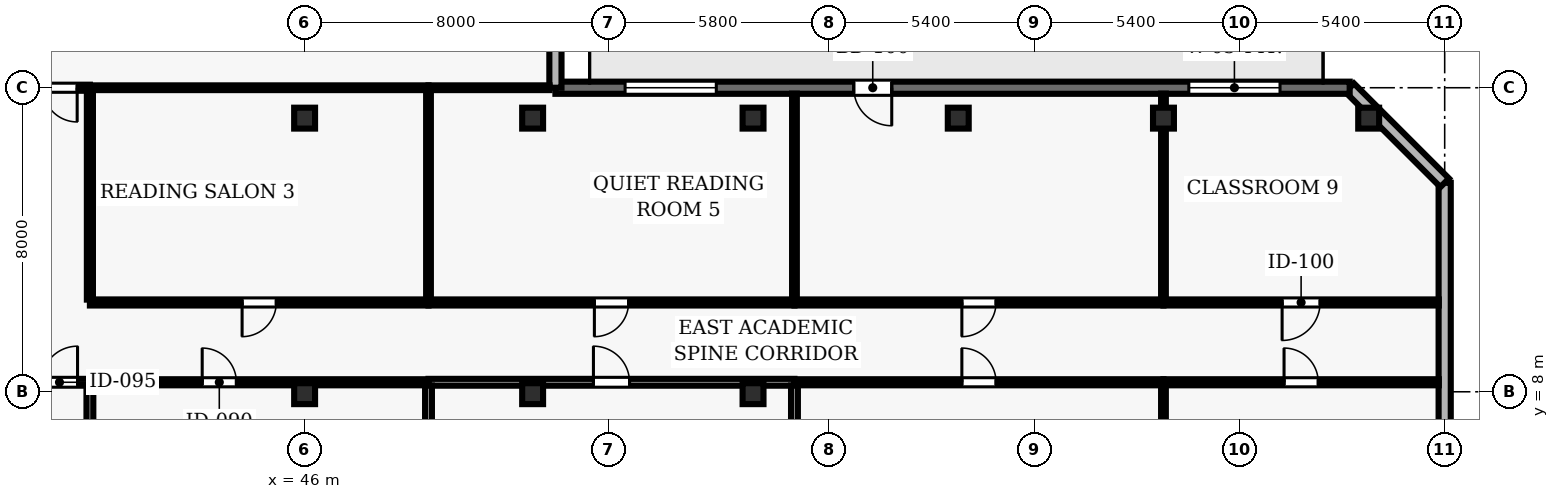
"""IFC4 building model, lengths in metres.
Left out: names, types, materials, properties, quantities, classifications, styles, units other than length and angle.
Written with IfcOpenShell. Run it as: python <this file> out.ifc"""

import sys

from ifc_helpers import new_model, si_unit, direction, frame, frame_2d, origin, origin_2d, place, context, subcontext, project, spatial, rectangle, hollow_rectangle, extrude, element, fill, save


model = new_model("IFC4")
c1 = context("Model", 3, precision=1e-05, world=origin(), true_north=direction((0.0, 1.0)))
c2 = subcontext(c1, "Body", "Model", "MODEL_VIEW")
j1 = project(units=[si_unit("LENGTHUNIT", "METRE"), si_unit("PLANEANGLEUNIT", "RADIAN")], contexts=[c1])
p1 = place(None, origin())
s1 = spatial("IfcSite", under=j1, at=p1, CompositionType="ELEMENT")
p2 = place(p1, origin())
s2 = spatial("IfcBuilding", under=s1, at=p2, CompositionType="ELEMENT")
p3 = place(p2, frame((0.0, 0.0, 54.4)))
s3 = spatial("IfcBuildingStorey", under=s2, at=p3, CompositionType="ELEMENT", Elevation=54.4)
for number, where, z_axis, x_axis in (
    (1, (46.0, 7.95, 0.0), (0.0, 0.0, 1.0), (1.0, 0.0, 0.0)),
    (2, (46.0, 15.2, 0.0), (0.0, 0.0, 1.0), (1.0, 0.0, 0.0)),
    (3, (52.0, 7.95, 0.0), (0.0, 0.0, 1.0), (1.0, 0.0, 0.0)),
    (4, (52.0, 15.2, 0.0), (0.0, 0.0, 1.0), (1.0, 0.0, 0.0)),
    (5, (57.8, 7.95, 0.0), (0.0, 0.0, 1.0), (1.0, 0.0, 0.0)),
    (6, (57.8, 15.2, 0.0), (0.0, 0.0, 1.0), (1.0, 0.0, 0.0)),
    (7, (63.2, 15.2, 0.0), (0.0, 0.0, 1.0), (1.0, 0.0, 0.0)),
    (8, (68.6, 15.2, 0.0), (0.0, 0.0, 1.0), (1.0, 0.0, 0.0)),
    (9, (74.0, 15.2, 0.0), (0.0, 0.0, 1.0), (1.0, 0.0, 0.0)),
):
    element("IfcColumn", number, at=place(p3, frame(where, z_axis=z_axis, x_axis=x_axis)), inside=s3, PredefinedType="COLUMN", context=c2, shape_type="SweptSolid", body=[
        extrude(hollow_rectangle(XDim=0.55, YDim=0.55, WallThickness=0.025, at=origin_2d()), origin(), (0.0, 0.0, 1.0), 3.9),
    ])
p4 = place(p3, frame((76.0, 2.5, 0.0), z_axis=(0.0, 0.0, 1.0), x_axis=(0.0, 1.0, 0.0)))
e10 = element("IfcWall", 10, at=p4, inside=s3, PredefinedType="SOLIDWALL", context=c2, shape_type="SweptSolid", body=[
    extrude(rectangle(XDim=11.0, YDim=0.32, at=frame_2d((5.5, 0.0))), origin(), (0.0, 0.0, 1.0), 3.69),
])
p5 = place(p4, frame((1.85, 0.0, 0.9)))
e11 = element("IfcOpeningElement", 11, at=p5, cuts=e10, PredefinedType="OPENING", context=c2, shape_type="SweptSolid", body=[
    extrude(rectangle(XDim=1.8, YDim=1.6, at=frame_2d((0.9, 0.8))), frame((0.0, 0.17, 0.0), z_axis=(0.0, -1.0, 0.0), x_axis=(1.0, 0.0, 0.0)), (0.0, 0.0, 1.0), 0.34),
])
p6 = place(p3, frame((76.0, 13.5, 0.0), z_axis=(0.0, 0.0, 1.0), x_axis=(-0.707106781187, 0.707106781187, 0.0)))
e12 = element("IfcWall", 12, at=p6, inside=s3, PredefinedType="SOLIDWALL", context=c2, shape_type="SweptSolid", body=[
    extrude(rectangle(XDim=3.536, YDim=0.32, at=frame_2d((1.768, 0.0))), origin(), (0.0, 0.0, 1.0), 3.69),
])
p7 = place(p3, frame((73.5, 16.0, 0.0), z_axis=(0.0, 0.0, 1.0), x_axis=(-1.0, 0.0, 0.0)))
e13 = element("IfcWall", 13, at=p7, inside=s3, PredefinedType="SOLIDWALL", context=c2, shape_type="SweptSolid", body=[
    extrude(rectangle(XDim=20.9, YDim=0.32, at=frame_2d((10.45, 0.0))), origin(), (0.0, 0.0, 1.0), 3.69),
])
p8 = place(p7, frame((12.05, 0.0, 0.0)))
e14 = element("IfcOpeningElement", 14, at=p8, cuts=e13, PredefinedType="OPENING", context=c2, shape_type="SweptSolid", body=[
    extrude(rectangle(XDim=1.0, YDim=2.2, at=frame_2d((0.5, 1.1))), frame((0.0, 0.17, 0.0), z_axis=(0.0, -1.0, 0.0), x_axis=(1.0, 0.0, 0.0)), (0.0, 0.0, 1.0), 0.34),
])
p9 = place(p7, frame((1.833, 0.0, 0.9)))
e15 = element("IfcOpeningElement", 15, at=p9, cuts=e13, PredefinedType="OPENING", context=c2, shape_type="SweptSolid", body=[
    extrude(rectangle(XDim=2.4, YDim=1.6, at=frame_2d((1.2, 0.8))), frame((0.0, 0.17, 0.0), z_axis=(0.0, -1.0, 0.0), x_axis=(1.0, 0.0, 0.0)), (0.0, 0.0, 1.0), 0.34),
])
p10 = place(p7, frame((16.667, 0.0, 0.9)))
e16 = element("IfcOpeningElement", 16, at=p10, cuts=e13, PredefinedType="OPENING", context=c2, shape_type="SweptSolid", body=[
    extrude(rectangle(XDim=2.4, YDim=1.6, at=frame_2d((1.2, 0.8))), frame((0.0, 0.17, 0.0), z_axis=(0.0, -1.0, 0.0), x_axis=(1.0, 0.0, 0.0)), (0.0, 0.0, 1.0), 0.34),
])
p11 = place(p3, frame((52.6, 16.0, 0.0), z_axis=(0.0, 0.0, 1.0), x_axis=(0.0, 1.0, 0.0)))
e17 = element("IfcWall", 17, at=p11, inside=s3, PredefinedType="SOLIDWALL", context=c2, shape_type="SweptSolid", body=[
    extrude(rectangle(XDim=10.095, YDim=0.32, at=frame_2d((5.047, 0.0))), origin(), (0.0, 0.0, 1.0), 3.69),
])
p12 = place(p11, frame((4.297, 0.0, 0.9)))
e18 = element("IfcOpeningElement", 18, at=p12, cuts=e17, PredefinedType="OPENING", context=c2, shape_type="SweptSolid", body=[
    extrude(rectangle(XDim=1.5, YDim=1.8, at=frame_2d((0.75, 0.9))), frame((0.0, 0.17, 0.0), z_axis=(0.0, -1.0, 0.0), x_axis=(1.0, 0.0, 0.0)), (0.0, 0.0, 1.0), 0.34),
])
p13 = place(p3, frame((38.05, 8.25, 0.0), z_axis=(0.0, 0.0, 1.0), x_axis=(1.0, 0.0, 0.0)))
e19 = element("IfcWall", 19, at=p13, inside=s3, PredefinedType="PARTITIONING", context=c2, shape_type="SweptSolid", body=[
    extrude(rectangle(XDim=2.3, YDim=0.18, at=frame_2d((1.15, 0.0))), origin(), (0.0, 0.0, 1.0), 2.995),
])
p14 = place(p13, frame((1.025, 0.0, 0.0)))
e20 = element("IfcOpeningElement", 20, at=p14, cuts=e19, PredefinedType="OPENING", context=c2, shape_type="SweptSolid", body=[
    extrude(rectangle(XDim=0.95, YDim=2.1, at=frame_2d((0.475, 1.05))), frame((0.0, 0.1, 0.0), z_axis=(0.0, -1.0, 0.0), x_axis=(1.0, 0.0, 0.0)), (0.0, 0.0, 1.0), 0.2),
])
p15 = place(p3, frame((40.35, 8.25, 0.0), z_axis=(0.0, 0.0, 1.0), x_axis=(1.0, 0.0, 0.0)))
e21 = element("IfcWall", 21, at=p15, inside=s3, PredefinedType="PARTITIONING", context=c2, shape_type="SweptSolid", body=[
    extrude(rectangle(XDim=8.91, YDim=0.16, at=frame_2d((4.455, 0.0))), origin(), (0.0, 0.0, 1.0), 2.995),
])
p16 = place(p15, frame((2.955, 0.0, 0.0)))
e22 = element("IfcOpeningElement", 22, at=p16, cuts=e21, PredefinedType="OPENING", context=c2, shape_type="SweptSolid", body=[
    extrude(rectangle(XDim=0.9, YDim=2.1, at=frame_2d((0.45, 1.05))), frame((0.0, 0.09, 0.0), z_axis=(0.0, -1.0, 0.0), x_axis=(1.0, 0.0, 0.0)), (0.0, 0.0, 1.0), 0.18),
])
p17 = place(p3, frame((40.35, 16.0, 0.0), z_axis=(0.0, 0.0, 1.0), x_axis=(-1.0, 0.0, 0.0)))
e23 = element("IfcWall", 23, at=p17, inside=s3, PredefinedType="PARTITIONING", context=c2, shape_type="SweptSolid", body=[
    extrude(rectangle(XDim=2.27, YDim=0.16, at=frame_2d((1.135, 0.0))), origin(), (0.0, 0.0, 1.0), 3.69),
])
p18 = place(p17, frame((0.335, 0.0, 0.0)))
e24 = element("IfcOpeningElement", 24, at=p18, cuts=e23, PredefinedType="OPENING", context=c2, shape_type="SweptSolid", body=[
    extrude(rectangle(XDim=0.9, YDim=2.1, at=frame_2d((0.45, 1.05))), frame((0.0, 0.09, 0.0), z_axis=(0.0, -1.0, 0.0), x_axis=(1.0, 0.0, 0.0)), (0.0, 0.0, 1.0), 0.18),
])
p19 = place(p3, frame((49.26, 8.25, 0.0), z_axis=(0.0, 0.0, 1.0), x_axis=(1.0, 0.0, 0.0)))
e25 = element("IfcWall", 25, at=p19, inside=s3, PredefinedType="PARTITIONING", context=c2, shape_type="SweptSolid", body=[
    extrude(rectangle(XDim=9.63, YDim=0.18, at=frame_2d((4.815, 0.0))), origin(), (0.0, 0.0, 1.0), 2.995),
])
p20 = place(p19, frame((4.34, 0.0, 0.0)))
e26 = element("IfcOpeningElement", 26, at=p20, cuts=e25, PredefinedType="OPENING", context=c2, shape_type="SweptSolid", body=[
    extrude(rectangle(XDim=0.95, YDim=2.1, at=frame_2d((0.475, 1.05))), frame((0.0, 0.1, 0.0), z_axis=(0.0, -1.0, 0.0), x_axis=(1.0, 0.0, 0.0)), (0.0, 0.0, 1.0), 0.2),
])
p21 = place(p3, frame((49.26, 10.35, 0.0), z_axis=(0.0, 0.0, 1.0), x_axis=(-1.0, 0.0, 0.0)))
e27 = element("IfcWall", 27, at=p21, inside=s3, PredefinedType="PARTITIONING", context=c2, shape_type="SweptSolid", body=[
    extrude(rectangle(XDim=8.91, YDim=0.16, at=frame_2d((4.455, 0.0))), origin(), (0.0, 0.0, 1.0), 3.227),
])
p22 = place(p21, frame((4.005, 0.0, 0.0)))
e28 = element("IfcOpeningElement", 28, at=p22, cuts=e27, PredefinedType="OPENING", context=c2, shape_type="SweptSolid", body=[
    extrude(rectangle(XDim=0.9, YDim=2.1, at=frame_2d((0.45, 1.05))), frame((0.0, 0.09, 0.0), z_axis=(0.0, -1.0, 0.0), x_axis=(1.0, 0.0, 0.0)), (0.0, 0.0, 1.0), 0.18),
])
p23 = place(p3, frame((49.26, 16.0, 0.0), z_axis=(0.0, 0.0, 1.0), x_axis=(1.0, 0.0, 0.0)))
e29 = element("IfcWall", 29, at=p23, inside=s3, PredefinedType="PARTITIONING", context=c2, shape_type="SweptSolid", body=[
    extrude(rectangle(XDim=3.185, YDim=0.125, at=frame_2d((1.593, 0.0))), origin(), (0.0, 0.0, 1.0), 3.39),
])
p24 = place(p3, frame((49.26, 16.0, 0.0), z_axis=(0.0, 0.0, 1.0), x_axis=(-1.0, 0.0, 0.0)))
e30 = element("IfcWall", 30, at=p24, inside=s3, PredefinedType="PARTITIONING", context=c2, shape_type="SweptSolid", body=[
    extrude(rectangle(XDim=8.91, YDim=0.125, at=frame_2d((4.455, 0.0))), origin(), (0.0, 0.0, 1.0), 3.69),
])
p25 = place(p3, frame((58.89, 8.25, 0.0), z_axis=(0.0, 0.0, 1.0), x_axis=(1.0, 0.0, 0.0)))
e31 = element("IfcWall", 31, at=p25, inside=s3, PredefinedType="PARTITIONING", context=c2, shape_type="SweptSolid", body=[
    extrude(rectangle(XDim=9.71, YDim=0.16, at=frame_2d((4.855, 0.0))), origin(), (0.0, 0.0, 1.0), 3.69),
])
p26 = place(p25, frame((4.405, 0.0, 0.0)))
e32 = element("IfcOpeningElement", 32, at=p26, cuts=e31, PredefinedType="OPENING", context=c2, shape_type="SweptSolid", body=[
    extrude(rectangle(XDim=0.9, YDim=2.1, at=frame_2d((0.45, 1.05))), frame((0.0, 0.09, 0.0), z_axis=(0.0, -1.0, 0.0), x_axis=(1.0, 0.0, 0.0)), (0.0, 0.0, 1.0), 0.18),
])
p27 = place(p3, frame((58.89, 10.35, 0.0), z_axis=(0.0, 0.0, 1.0), x_axis=(-1.0, 0.0, 0.0)))
e33 = element("IfcWall", 33, at=p27, inside=s3, PredefinedType="PARTITIONING", context=c2, shape_type="SweptSolid", body=[
    extrude(rectangle(XDim=9.63, YDim=0.16, at=frame_2d((4.815, 0.0))), origin(), (0.0, 0.0, 1.0), 3.227),
])
p28 = place(p27, frame((4.365, 0.0, 0.0)))
e34 = element("IfcOpeningElement", 34, at=p28, cuts=e33, PredefinedType="OPENING", context=c2, shape_type="SweptSolid", body=[
    extrude(rectangle(XDim=0.9, YDim=2.1, at=frame_2d((0.45, 1.05))), frame((0.0, 0.09, 0.0), z_axis=(0.0, -1.0, 0.0), x_axis=(1.0, 0.0, 0.0)), (0.0, 0.0, 1.0), 0.18),
])
p29 = place(p3, frame((68.6, 8.25, 0.0), z_axis=(0.0, 0.0, 1.0), x_axis=(1.0, 0.0, 0.0)))
e35 = element("IfcWall", 35, at=p29, inside=s3, PredefinedType="PARTITIONING", context=c2, shape_type="SweptSolid", body=[
    extrude(rectangle(XDim=7.245, YDim=0.16, at=frame_2d((3.623, 0.0))), origin(), (0.0, 0.0, 1.0), 3.69),
])
p30 = place(p29, frame((3.173, 0.0, 0.0)))
e36 = element("IfcOpeningElement", 36, at=p30, cuts=e35, PredefinedType="OPENING", context=c2, shape_type="SweptSolid", body=[
    extrude(rectangle(XDim=0.9, YDim=2.1, at=frame_2d((0.45, 1.05))), frame((0.0, 0.09, 0.0), z_axis=(0.0, -1.0, 0.0), x_axis=(1.0, 0.0, 0.0)), (0.0, 0.0, 1.0), 0.18),
])
p31 = place(p3, frame((68.6, 10.35, 0.0), z_axis=(0.0, 0.0, 1.0), x_axis=(-1.0, 0.0, 0.0)))
e37 = element("IfcWall", 37, at=p31, inside=s3, PredefinedType="PARTITIONING", context=c2, shape_type="SweptSolid", body=[
    extrude(rectangle(XDim=9.71, YDim=0.16, at=frame_2d((4.855, 0.0))), origin(), (0.0, 0.0, 1.0), 3.227),
])
p32 = place(p31, frame((4.405, 0.0, 0.0)))
e38 = element("IfcOpeningElement", 38, at=p32, cuts=e37, PredefinedType="OPENING", context=c2, shape_type="SweptSolid", body=[
    extrude(rectangle(XDim=0.9, YDim=2.1, at=frame_2d((0.45, 1.05))), frame((0.0, 0.09, 0.0), z_axis=(0.0, -1.0, 0.0), x_axis=(1.0, 0.0, 0.0)), (0.0, 0.0, 1.0), 0.18),
])
p33 = place(p3, frame((75.845, 10.35, 0.0), z_axis=(0.0, 0.0, 1.0), x_axis=(-1.0, 0.0, 0.0)))
e39 = element("IfcWall", 39, at=p33, inside=s3, PredefinedType="PARTITIONING", context=c2, shape_type="SweptSolid", body=[
    extrude(rectangle(XDim=7.245, YDim=0.16, at=frame_2d((3.623, 0.0))), origin(), (0.0, 0.0, 1.0), 3.69),
])
p34 = place(p33, frame((3.123, 0.0, 0.0)))
e40 = element("IfcOpeningElement", 40, at=p34, cuts=e39, PredefinedType="OPENING", context=c2, shape_type="SweptSolid", body=[
    extrude(rectangle(XDim=1.0, YDim=2.1, at=frame_2d((0.5, 1.05))), frame((0.0, 0.09, 0.0), z_axis=(0.0, -1.0, 0.0), x_axis=(1.0, 0.0, 0.0)), (0.0, 0.0, 1.0), 0.18),
])
p35 = place(p3, frame((40.35, 0.09, 0.0), z_axis=(0.0, 0.0, 1.0), x_axis=(0.0, 1.0, 0.0)))
e41 = element("IfcWall", 41, at=p35, inside=s3, PredefinedType="PARTITIONING", context=c2, shape_type="SweptSolid", body=[
    extrude(rectangle(XDim=8.075, YDim=0.18, at=frame_2d((4.038, 0.0))), origin(), (0.0, 0.0, 1.0), 3.69),
])
p36 = place(p3, frame((40.35, 10.425, 0.0), z_axis=(0.0, 0.0, 1.0), x_axis=(0.0, 1.0, 0.0)))
e42 = element("IfcWall", 42, at=p36, inside=s3, PredefinedType="PARTITIONING", context=c2, shape_type="SweptSolid", body=[
    extrude(rectangle(XDim=5.5, YDim=0.16, at=frame_2d((2.75, 0.0))), origin(), (0.0, 0.0, 1.0), 3.227),
])
p37 = place(p3, frame((49.26, 0.09, 0.0), z_axis=(0.0, 0.0, 1.0), x_axis=(0.0, 1.0, 0.0)))
e43 = element("IfcWall", 43, at=p37, inside=s3, PredefinedType="PARTITIONING", context=c2, shape_type="SweptSolid", body=[
    extrude(rectangle(XDim=8.075, YDim=0.18, at=frame_2d((4.038, 0.0))), origin(), (0.0, 0.0, 1.0), 3.69),
])
p38 = place(p3, frame((49.26, 10.425, 0.0), z_axis=(0.0, 0.0, 1.0), x_axis=(0.0, 1.0, 0.0)))
e44 = element("IfcWall", 44, at=p38, inside=s3, PredefinedType="PARTITIONING", context=c2, shape_type="SweptSolid", body=[
    extrude(rectangle(XDim=5.518, YDim=0.125, at=frame_2d((2.759, 0.0))), origin(), (0.0, 0.0, 1.0), 3.69),
])
p39 = place(p3, frame((58.89, 0.155, 0.0), z_axis=(0.0, 0.0, 1.0), x_axis=(0.0, 1.0, 0.0)))
e45 = element("IfcWall", 45, at=p39, inside=s3, PredefinedType="PARTITIONING", context=c2, shape_type="SweptSolid", body=[
    extrude(rectangle(XDim=8.01, YDim=0.18, at=frame_2d((4.005, 0.0))), origin(), (0.0, 0.0, 1.0), 3.69),
])
p40 = place(p3, frame((58.89, 10.425, 0.0), z_axis=(0.0, 0.0, 1.0), x_axis=(0.0, 1.0, 0.0)))
e46 = element("IfcWall", 46, at=p40, inside=s3, PredefinedType="PARTITIONING", context=c2, shape_type="SweptSolid", body=[
    extrude(rectangle(XDim=5.42, YDim=0.125, at=frame_2d((2.71, 0.0))), origin(), (0.0, 0.0, 1.0), 3.69),
])
p41 = place(p3, frame((68.6, 0.155, 0.0), z_axis=(0.0, 0.0, 1.0), x_axis=(0.0, 1.0, 0.0)))
e47 = element("IfcWall", 47, at=p41, inside=s3, PredefinedType="PARTITIONING", context=c2, shape_type="SweptSolid", body=[
    extrude(rectangle(XDim=8.02, YDim=0.125, at=frame_2d((4.01, 0.0))), origin(), (0.0, 0.0, 1.0), 2.995),
])
p42 = place(p3, frame((68.6, 10.425, 0.0), z_axis=(0.0, 0.0, 1.0), x_axis=(0.0, 1.0, 0.0)))
e48 = element("IfcWall", 48, at=p42, inside=s3, PredefinedType="PARTITIONING", context=c2, shape_type="SweptSolid", body=[
    extrude(rectangle(XDim=5.42, YDim=0.125, at=frame_2d((2.71, 0.0))), origin(), (0.0, 0.0, 1.0), 2.995),
])
p43 = place(p8, origin())
e49 = element("IfcDoor", 49, at=p43, inside=s3, OperationType="SINGLE_SWING_LEFT", PredefinedType="DOOR", context=c2, shape_type="SweptSolid", body=[
    extrude(rectangle(XDim=1.0, YDim=2.2, at=frame_2d((0.5, 1.1))), frame((0.0, 0.025, 0.0), z_axis=(0.0, -1.0, 0.0), x_axis=(1.0, 0.0, 0.0)), (0.0, 0.0, 1.0), 0.05),
])
fill(e14, e49)
p44 = place(p9, origin())
e50 = element("IfcWindow", 50, at=p44, inside=s3, PartitioningType="SINGLE_PANEL", PredefinedType="WINDOW", context=c2, shape_type="SweptSolid", body=[
    extrude(rectangle(XDim=2.4, YDim=1.6, at=frame_2d((1.2, 0.8))), frame((0.0, 0.03, 0.0), z_axis=(0.0, -1.0, 0.0), x_axis=(1.0, 0.0, 0.0)), (0.0, 0.0, 1.0), 0.06),
])
fill(e15, e50)
p45 = place(p10, origin())
e51 = element("IfcWindow", 51, at=p45, inside=s3, PartitioningType="SINGLE_PANEL", PredefinedType="WINDOW", context=c2, shape_type="SweptSolid", body=[
    extrude(rectangle(XDim=2.4, YDim=1.6, at=frame_2d((1.2, 0.8))), frame((0.0, 0.03, 0.0), z_axis=(0.0, -1.0, 0.0), x_axis=(1.0, 0.0, 0.0)), (0.0, 0.0, 1.0), 0.06),
])
fill(e16, e51)
p46 = place(p14, origin())
e52 = element("IfcDoor", 52, at=p46, inside=s3, OperationType="SINGLE_SWING_RIGHT", PredefinedType="DOOR", context=c2, shape_type="SweptSolid", body=[
    extrude(rectangle(XDim=0.95, YDim=2.1, at=frame_2d((0.475, 1.05))), frame((0.0, 0.025, 0.0), z_axis=(0.0, -1.0, 0.0), x_axis=(1.0, 0.0, 0.0)), (0.0, 0.0, 1.0), 0.05),
])
fill(e20, e52)
p47 = place(p16, origin())
e53 = element("IfcDoor", 53, at=p47, inside=s3, OperationType="SINGLE_SWING_LEFT", PredefinedType="DOOR", context=c2, shape_type="SweptSolid", body=[
    extrude(rectangle(XDim=0.9, YDim=2.1, at=frame_2d((0.45, 1.05))), frame((0.0, 0.025, 0.0), z_axis=(0.0, -1.0, 0.0), x_axis=(1.0, 0.0, 0.0)), (0.0, 0.0, 1.0), 0.05),
])
fill(e22, e53)
p48 = place(p22, origin())
e54 = element("IfcDoor", 54, at=p48, inside=s3, OperationType="SINGLE_SWING_RIGHT", PredefinedType="DOOR", context=c2, shape_type="SweptSolid", body=[
    extrude(rectangle(XDim=0.9, YDim=2.1, at=frame_2d((0.45, 1.05))), frame((0.0, 0.025, 0.0), z_axis=(0.0, -1.0, 0.0), x_axis=(1.0, 0.0, 0.0)), (0.0, 0.0, 1.0), 0.05),
])
fill(e28, e54)
p49 = place(p20, origin())
e55 = element("IfcDoor", 55, at=p49, inside=s3, OperationType="SINGLE_SWING_LEFT", PredefinedType="DOOR", context=c2, shape_type="SweptSolid", body=[
    extrude(rectangle(XDim=0.95, YDim=2.1, at=frame_2d((0.475, 1.05))), frame((0.0, 0.025, 0.0), z_axis=(0.0, -1.0, 0.0), x_axis=(1.0, 0.0, 0.0)), (0.0, 0.0, 1.0), 0.05),
])
fill(e26, e55)
p50 = place(p28, origin())
e56 = element("IfcDoor", 56, at=p50, inside=s3, OperationType="SINGLE_SWING_RIGHT", PredefinedType="DOOR", context=c2, shape_type="SweptSolid", body=[
    extrude(rectangle(XDim=0.9, YDim=2.1, at=frame_2d((0.45, 1.05))), frame((0.0, 0.025, 0.0), z_axis=(0.0, -1.0, 0.0), x_axis=(1.0, 0.0, 0.0)), (0.0, 0.0, 1.0), 0.05),
])
fill(e34, e56)
p51 = place(p26, origin())
e57 = element("IfcDoor", 57, at=p51, inside=s3, OperationType="SINGLE_SWING_LEFT", PredefinedType="DOOR", context=c2, shape_type="SweptSolid", body=[
    extrude(rectangle(XDim=0.9, YDim=2.1, at=frame_2d((0.45, 1.05))), frame((0.0, 0.025, 0.0), z_axis=(0.0, -1.0, 0.0), x_axis=(1.0, 0.0, 0.0)), (0.0, 0.0, 1.0), 0.05),
])
fill(e32, e57)
p52 = place(p32, origin())
e58 = element("IfcDoor", 58, at=p52, inside=s3, OperationType="SINGLE_SWING_RIGHT", PredefinedType="DOOR", context=c2, shape_type="SweptSolid", body=[
    extrude(rectangle(XDim=0.9, YDim=2.1, at=frame_2d((0.45, 1.05))), frame((0.0, 0.025, 0.0), z_axis=(0.0, -1.0, 0.0), x_axis=(1.0, 0.0, 0.0)), (0.0, 0.0, 1.0), 0.05),
])
fill(e38, e58)
p53 = place(p30, origin())
e59 = element("IfcDoor", 59, at=p53, inside=s3, OperationType="SINGLE_SWING_LEFT", PredefinedType="DOOR", context=c2, shape_type="SweptSolid", body=[
    extrude(rectangle(XDim=0.9, YDim=2.1, at=frame_2d((0.45, 1.05))), frame((0.0, 0.025, 0.0), z_axis=(0.0, -1.0, 0.0), x_axis=(1.0, 0.0, 0.0)), (0.0, 0.0, 1.0), 0.05),
])
fill(e36, e59)
p54 = place(p34, origin())
e60 = element("IfcDoor", 60, at=p54, inside=s3, OperationType="SINGLE_SWING_RIGHT", PredefinedType="DOOR", context=c2, shape_type="SweptSolid", body=[
    extrude(rectangle(XDim=1.0, YDim=2.1, at=frame_2d((0.5, 1.05))), frame((0.0, 0.025, 0.0), z_axis=(0.0, -1.0, 0.0), x_axis=(1.0, 0.0, 0.0)), (0.0, 0.0, 1.0), 0.05),
])
fill(e40, e60)
p55 = place(p18, origin())
e61 = element("IfcDoor", 61, at=p55, inside=s3, OperationType="SINGLE_SWING_LEFT", PredefinedType="DOOR", context=c2, shape_type="SweptSolid", body=[
    extrude(rectangle(XDim=0.9, YDim=2.1, at=frame_2d((0.45, 1.05))), frame((0.0, 0.025, 0.0), z_axis=(0.0, -1.0, 0.0), x_axis=(1.0, 0.0, 0.0)), (0.0, 0.0, 1.0), 0.05),
])
fill(e24, e61)
save(model, sys.argv[1])
